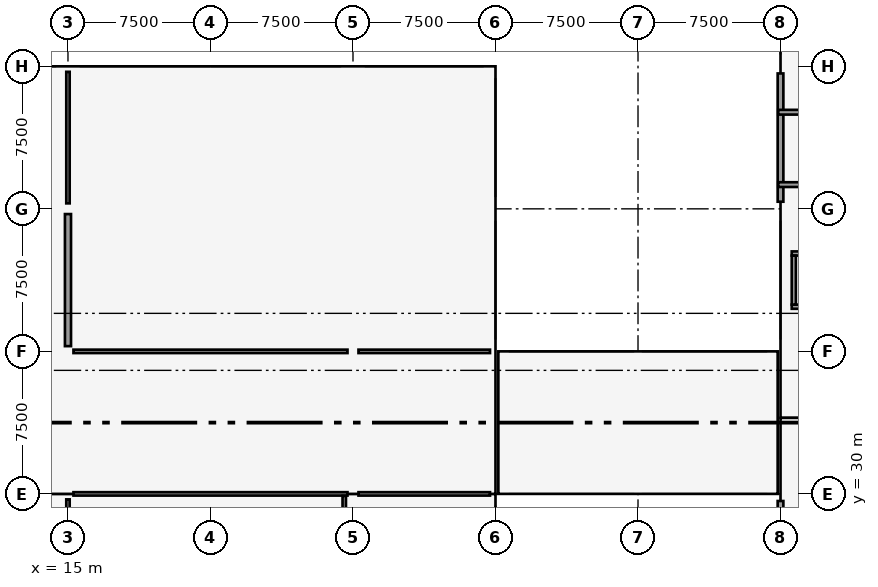
"""IFC4 building model, lengths in metres.
Left out: names, types, materials, properties, quantities, classifications, styles, units other than length and angle.
Written with IfcOpenShell. Run it as: python <this file> out.ifc"""

import sys

from ifc_helpers import new_model, si_unit, direction, frame, frame_2d, origin, origin_2d, place, context, subcontext, project, spatial, rectangle, extrude, element, fill, save


model = new_model("IFC4")
c1 = context("Model", 3, precision=1e-05, world=origin(), true_north=direction((0.0, 1.0)))
c2 = subcontext(c1, "Body", "Model", "MODEL_VIEW")
j1 = project(units=[si_unit("LENGTHUNIT", "METRE"), si_unit("PLANEANGLEUNIT", "RADIAN")], contexts=[c1])
p1 = place(None, origin())
s1 = spatial("IfcSite", under=j1, at=p1, CompositionType="ELEMENT")
p2 = place(p1, origin())
s2 = spatial("IfcBuilding", under=s1, at=p2, CompositionType="ELEMENT")
p3 = place(p2, frame((0.0, 0.0, 13.2)))
s3 = spatial("IfcBuildingStorey", under=s2, at=p3, CompositionType="ELEMENT", Elevation=13.2)
for number, where, z_axis, x_axis in (
    (1, (52.5, 30.0, 0.0), (0.0, 0.0, 1.0), (1.0, 0.0, 0.0)),
    (2, (52.5, 37.5, 0.0), (0.0, 0.0, 1.0), (1.0, 0.0, 0.0)),
    (3, (52.5, 45.0, 0.0), (0.0, 0.0, 1.0), (1.0, 0.0, 0.0)),
    (4, (52.5, 52.5, 0.0), (0.0, 0.0, 1.0), (1.0, 0.0, 0.0)),
):
    element("IfcColumn", number, at=place(p3, frame(where, z_axis=z_axis, x_axis=x_axis)), inside=s3, PredefinedType="COLUMN", context=c2, shape_type="SweptSolid", body=[
        extrude(rectangle(XDim=0.72, YDim=0.72, at=origin_2d()), origin(), (0.0, 0.0, 1.0), 3.9),
    ])
for number, where, z_axis, x_axis in (
    (5, (15.0, 30.0, 0.0), (0.0, 0.0, 1.0), (1.0, 0.0, 0.0)),
    (6, (15.0, 37.5, 0.0), (0.0, 0.0, 1.0), (1.0, 0.0, 0.0)),
    (7, (15.0, 45.0, 0.0), (0.0, 0.0, 1.0), (1.0, 0.0, 0.0)),
    (8, (15.0, 52.5, 0.0), (0.0, 0.0, 1.0), (1.0, 0.0, 0.0)),
    (9, (30.0, 30.0, 0.0), (0.0, 0.0, 1.0), (1.0, 0.0, 0.0)),
    (10, (30.0, 37.5, 0.0), (0.0, 0.0, 1.0), (1.0, 0.0, 0.0)),
    (11, (30.0, 45.0, 0.0), (0.0, 0.0, 1.0), (1.0, 0.0, 0.0)),
    (12, (30.0, 52.5, 0.0), (0.0, 0.0, 1.0), (1.0, 0.0, 0.0)),
    (13, (37.5, 30.0, 0.0), (0.0, 0.0, 1.0), (1.0, 0.0, 0.0)),
    (14, (37.5, 37.5, 0.0), (0.0, 0.0, 1.0), (1.0, 0.0, 0.0)),
    (15, (37.5, 45.0, 0.0), (0.0, 0.0, 1.0), (1.0, 0.0, 0.0)),
    (16, (37.5, 52.5, 0.0), (0.0, 0.0, 1.0), (1.0, 0.0, 0.0)),
):
    element("IfcColumn", number, at=place(p3, frame(where, z_axis=z_axis, x_axis=x_axis)), inside=s3, PredefinedType="COLUMN", context=c2, shape_type="SweptSolid", body=[
        extrude(rectangle(XDim=0.55, YDim=0.55, at=origin_2d()), origin(), (0.0, 0.0, 1.0), 3.9),
    ])
p4 = place(p3, frame((15.0, 37.775, 0.0), z_axis=(0.0, 0.0, 1.0), x_axis=(0.0, 1.0, 0.0)))
e17 = element("IfcWall", 17, at=p4, inside=s3, PredefinedType="SHEAR", context=c2, shape_type="SweptSolid", body=[
    extrude(rectangle(XDim=6.95, YDim=0.32, at=frame_2d((3.475, 0.0))), origin(), (0.0, 0.0, 1.0), 3.6),
])
p5 = place(p3, frame((52.5, 23.065, 0.0), z_axis=(0.0, 0.0, 1.0), x_axis=(0.0, 1.0, 0.0)))
e18 = element("IfcWall", 18, at=p5, inside=s3, PredefinedType="SOLIDWALL", context=c2, shape_type="SweptSolid", body=[
    extrude(rectangle(XDim=6.56, YDim=0.3, at=frame_2d((3.28, 0.0))), origin(), (0.0, 0.0, 1.0), 2.39),
])
p6 = place(p3, frame((52.5, 45.375, 0.0), z_axis=(0.0, 0.0, 1.0), x_axis=(0.0, 1.0, 0.0)))
e19 = element("IfcWall", 19, at=p6, inside=s3, PredefinedType="SOLIDWALL", context=c2, shape_type="SweptSolid", body=[
    extrude(rectangle(XDim=6.75, YDim=0.3, at=frame_2d((3.375, 0.0))), origin(), (0.0, 0.0, 1.0), 2.64),
])
p7 = place(p3, frame((52.38, 46.275, 0.0), z_axis=(0.0, 0.0, 1.0), x_axis=(1.0, 0.0, 0.0)))
e20 = element("IfcWall", 20, at=p7, inside=s3, PredefinedType="SOLIDWALL", context=c2, shape_type="SweptSolid", body=[
    extrude(rectangle(XDim=7.26, YDim=0.25, at=frame_2d((3.63, 0.0))), origin(), (0.0, 0.0, 1.0), 3.62),
])
p8 = place(p7, frame((0.62, 0.0, 0.0)))
e21 = element("IfcOpeningElement", 21, at=p8, cuts=e20, PredefinedType="OPENING", context=c2, shape_type="SweptSolid", body=[
    extrude(rectangle(XDim=1.1, YDim=2.15, at=frame_2d((0.55, 1.075))), frame((0.0, 0.135, 0.0), z_axis=(0.0, -1.0, 0.0), x_axis=(1.0, 0.0, 0.0)), (0.0, 0.0, 1.0), 0.27),
])
p9 = place(p3, frame((52.38, 50.085, 0.0), z_axis=(0.0, 0.0, 1.0), x_axis=(1.0, 0.0, 0.0)))
e22 = element("IfcWall", 22, at=p9, inside=s3, PredefinedType="SOLIDWALL", context=c2, shape_type="SweptSolid", body=[
    extrude(rectangle(XDim=7.26, YDim=0.25, at=frame_2d((3.63, 0.0))), origin(), (0.0, 0.0, 1.0), 3.62),
])
p10 = place(p9, frame((0.62, 0.0, 0.0)))
e23 = element("IfcOpeningElement", 23, at=p10, cuts=e22, PredefinedType="OPENING", context=c2, shape_type="SweptSolid", body=[
    extrude(rectangle(XDim=1.1, YDim=2.15, at=frame_2d((0.55, 1.075))), frame((0.0, 0.135, 0.0), z_axis=(0.0, -1.0, 0.0), x_axis=(1.0, 0.0, 0.0)), (0.0, 0.0, 1.0), 0.27),
])
for number, where, z_axis, x_axis in (
    (24, (53.09, 39.85, 0.0), (0.0, 0.0, 1.0), (1.0, 0.0, 0.0)),
    (25, (53.09, 42.65, 0.0), (0.0, 0.0, 1.0), (1.0, 0.0, 0.0)),
):
    element("IfcWall", number, at=place(p3, frame(where, z_axis=z_axis, x_axis=x_axis)), inside=s3, PredefinedType="SOLIDWALL", context=c2, shape_type="SweptSolid", body=[
        extrude(rectangle(XDim=2.62, YDim=0.22, at=frame_2d((1.31, 0.0))), origin(), (0.0, 0.0, 1.0), 3.62),
    ])
p11 = place(p3, frame((53.2, 39.96, 0.0), z_axis=(0.0, 0.0, 1.0), x_axis=(0.0, 1.0, 0.0)))
e26 = element("IfcWall", 26, at=p11, inside=s3, PredefinedType="SOLIDWALL", context=c2, shape_type="SweptSolid", body=[
    extrude(rectangle(XDim=2.58, YDim=0.22, at=frame_2d((1.29, 0.0))), origin(), (0.0, 0.0, 1.0), 3.62),
])
p12 = place(p3, frame((15.289, 30.0, 0.0), z_axis=(0.0, 0.0, 1.0), x_axis=(1.0, 0.0, 0.0)))
e27 = element("IfcWall", 27, at=p12, inside=s3, PredefinedType="PARTITIONING", context=c2, shape_type="SweptSolid", body=[
    extrude(rectangle(XDim=14.422, YDim=0.18, at=frame_2d((7.211, 0.0))), origin(), (0.0, 0.0, 1.0), 2.59),
])
p13 = place(p3, frame((30.289, 30.0, 0.0), z_axis=(0.0, 0.0, 1.0), x_axis=(1.0, 0.0, 0.0)))
e28 = element("IfcWall", 28, at=p13, inside=s3, PredefinedType="PARTITIONING", context=c2, shape_type="SweptSolid", body=[
    extrude(rectangle(XDim=6.922, YDim=0.18, at=frame_2d((3.461, 0.0))), origin(), (0.0, 0.0, 1.0), 2.59),
])
p14 = place(p13, frame((2.711, 0.0, 0.0)))
e29 = element("IfcOpeningElement", 29, at=p14, cuts=e28, PredefinedType="OPENING", context=c2, shape_type="SweptSolid", body=[
    extrude(rectangle(XDim=1.5, YDim=2.16, at=frame_2d((0.75, 1.08))), frame((0.0, 0.1, 0.0), z_axis=(0.0, -1.0, 0.0), x_axis=(1.0, 0.0, 0.0)), (0.0, 0.0, 1.0), 0.2),
])
p15 = place(p3, frame((15.289, 37.5, 0.0), z_axis=(0.0, 0.0, 1.0), x_axis=(1.0, 0.0, 0.0)))
e30 = element("IfcWall", 30, at=p15, inside=s3, PredefinedType="PARTITIONING", context=c2, shape_type="SweptSolid", body=[
    extrude(rectangle(XDim=14.422, YDim=0.18, at=frame_2d((7.211, 0.0))), origin(), (0.0, 0.0, 1.0), 2.59),
])
p16 = place(p15, frame((6.461, 0.0, 0.0)))
e31 = element("IfcOpeningElement", 31, at=p16, cuts=e30, PredefinedType="OPENING", context=c2, shape_type="SweptSolid", body=[
    extrude(rectangle(XDim=1.5, YDim=2.16, at=frame_2d((0.75, 1.08))), frame((0.0, 0.1, 0.0), z_axis=(0.0, -1.0, 0.0), x_axis=(1.0, 0.0, 0.0)), (0.0, 0.0, 1.0), 0.2),
])
p17 = place(p3, frame((30.289, 37.5, 0.0), z_axis=(0.0, 0.0, 1.0), x_axis=(1.0, 0.0, 0.0)))
e32 = element("IfcWall", 32, at=p17, inside=s3, PredefinedType="PARTITIONING", context=c2, shape_type="SweptSolid", body=[
    extrude(rectangle(XDim=6.922, YDim=0.18, at=frame_2d((3.461, 0.0))), origin(), (0.0, 0.0, 1.0), 2.59),
])
p18 = place(p3, frame((29.54, 20.54, 0.0), z_axis=(0.0, 0.0, 1.0), x_axis=(0.0, 1.0, 0.0)))
e33 = element("IfcWall", 33, at=p18, inside=s3, PredefinedType="PARTITIONING", context=c2, shape_type="SweptSolid", body=[
    extrude(rectangle(XDim=9.356, YDim=0.18, at=frame_2d((4.678, 0.0))), origin(), (0.0, 0.0, 1.0), 2.59),
])
p19 = place(p3, frame((15.0, 22.789, 0.0), z_axis=(0.0, 0.0, 1.0), x_axis=(0.0, 1.0, 0.0)))
e34 = element("IfcWall", 34, at=p19, inside=s3, PredefinedType="PARTITIONING", context=c2, shape_type="SweptSolid", body=[
    extrude(rectangle(XDim=6.922, YDim=0.18, at=frame_2d((3.461, 0.0))), origin(), (0.0, 0.0, 1.0), 2.59),
])
p20 = place(p19, frame((2.886, 0.0, 0.0)))
e35 = element("IfcOpeningElement", 35, at=p20, cuts=e34, PredefinedType="OPENING", context=c2, shape_type="SweptSolid", body=[
    extrude(rectangle(XDim=1.15, YDim=2.14, at=frame_2d((0.575, 1.07))), frame((0.0, 0.1, 0.0), z_axis=(0.0, -1.0, 0.0), x_axis=(1.0, 0.0, 0.0)), (0.0, 0.0, 1.0), 0.2),
])
p21 = place(p3, frame((15.0, 45.289, 0.0), z_axis=(0.0, 0.0, 1.0), x_axis=(0.0, 1.0, 0.0)))
e36 = element("IfcWall", 36, at=p21, inside=s3, PredefinedType="PARTITIONING", context=c2, shape_type="SweptSolid", body=[
    extrude(rectangle(XDim=6.922, YDim=0.18, at=frame_2d((3.461, 0.0))), origin(), (0.0, 0.0, 1.0), 2.59),
])
p22 = place(p21, frame((2.711, 0.0, 0.0)))
e37 = element("IfcOpeningElement", 37, at=p22, cuts=e36, PredefinedType="OPENING", context=c2, shape_type="SweptSolid", body=[
    extrude(rectangle(XDim=1.5, YDim=2.16, at=frame_2d((0.75, 1.08))), frame((0.0, 0.1, 0.0), z_axis=(0.0, -1.0, 0.0), x_axis=(1.0, 0.0, 0.0)), (0.0, 0.0, 1.0), 0.2),
])
p23 = place(p8, origin())
e38 = element("IfcDoor", 38, at=p23, inside=s3, OperationType="SINGLE_SWING_LEFT", PredefinedType="DOOR", context=c2, shape_type="SweptSolid", body=[
    extrude(rectangle(XDim=1.1, YDim=2.15, at=frame_2d((0.55, 1.075))), frame((0.0, 0.025, 0.0), z_axis=(0.0, -1.0, 0.0), x_axis=(1.0, 0.0, 0.0)), (0.0, 0.0, 1.0), 0.05),
])
fill(e21, e38)
p24 = place(p10, frame((1.1, 0.0, 0.0), z_axis=(0.0, 0.0, 1.0), x_axis=(-1.0, 0.0, 0.0)))
e39 = element("IfcDoor", 39, at=p24, inside=s3, OperationType="SINGLE_SWING_RIGHT", PredefinedType="DOOR", context=c2, shape_type="SweptSolid", body=[
    extrude(rectangle(XDim=1.1, YDim=2.15, at=frame_2d((0.55, 1.075))), frame((0.0, 0.025, 0.0), z_axis=(0.0, -1.0, 0.0), x_axis=(1.0, 0.0, 0.0)), (0.0, 0.0, 1.0), 0.05),
])
fill(e23, e39)
p25 = place(p14, origin())
e40 = element("IfcDoor", 40, at=p25, inside=s3, OperationType="SINGLE_SWING_RIGHT", PredefinedType="DOOR", context=c2, shape_type="SweptSolid", body=[
    extrude(rectangle(XDim=1.5, YDim=2.16, at=frame_2d((0.75, 1.08))), frame((0.0, 0.025, 0.0), z_axis=(0.0, -1.0, 0.0), x_axis=(1.0, 0.0, 0.0)), (0.0, 0.0, 1.0), 0.05),
])
fill(e29, e40)
p26 = place(p16, origin())
e41 = element("IfcDoor", 41, at=p26, inside=s3, OperationType="SINGLE_SWING_LEFT", PredefinedType="DOOR", context=c2, shape_type="SweptSolid", body=[
    extrude(rectangle(XDim=1.5, YDim=2.16, at=frame_2d((0.75, 1.08))), frame((0.0, 0.025, 0.0), z_axis=(0.0, -1.0, 0.0), x_axis=(1.0, 0.0, 0.0)), (0.0, 0.0, 1.0), 0.05),
])
fill(e31, e41)
p27 = place(p22, origin())
e42 = element("IfcDoor", 42, at=p27, inside=s3, OperationType="SINGLE_SWING_LEFT", PredefinedType="DOOR", context=c2, shape_type="SweptSolid", body=[
    extrude(rectangle(XDim=1.5, YDim=2.16, at=frame_2d((0.75, 1.08))), frame((0.0, 0.025, 0.0), z_axis=(0.0, -1.0, 0.0), x_axis=(1.0, 0.0, 0.0)), (0.0, 0.0, 1.0), 0.05),
])
fill(e37, e42)
save(model, sys.argv[1])
